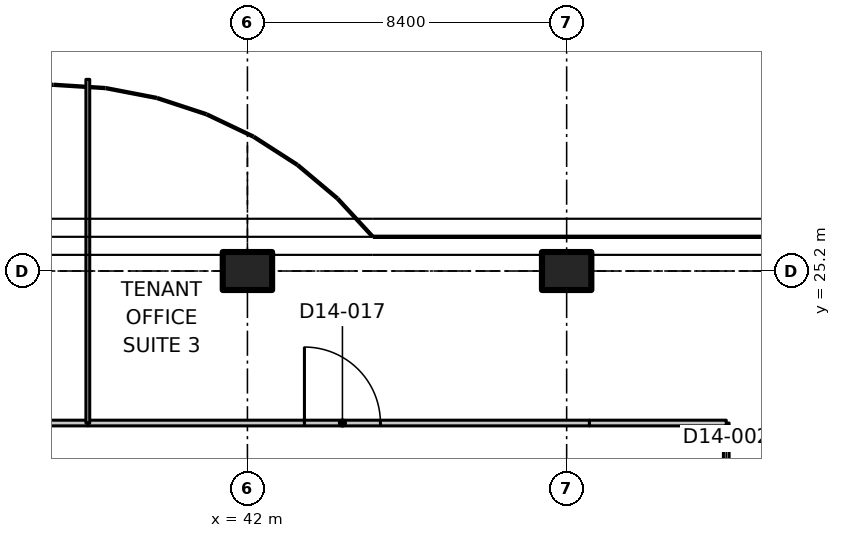
"""IFC4 building model, lengths in metres.
Left out: names, types, materials, properties, quantities, classifications, styles, units other than length and angle.
Written with IfcOpenShell. Run it as: python <this file> out.ifc"""

import sys

from ifc_helpers import new_model, si_unit, direction, frame, frame_2d, origin, origin_2d, place, context, subcontext, project, spatial, polyline, rectangle, outline, extrude, element, fill, save


model = new_model("IFC4")
c1 = context("Model", 3, precision=1e-05, world=origin(), true_north=direction((0.0, 1.0)))
c2 = subcontext(c1, "Body", "Model", "MODEL_VIEW")
j1 = project(units=[si_unit("LENGTHUNIT", "METRE"), si_unit("PLANEANGLEUNIT", "RADIAN")], contexts=[c1])
p1 = place(None, origin())
s1 = spatial("IfcSite", under=j1, at=p1, CompositionType="ELEMENT")
p2 = place(p1, origin())
s2 = spatial("IfcBuilding", under=s1, at=p2, CompositionType="ELEMENT")
p3 = place(p2, frame((0.0, 0.0, 102.5)))
s3 = spatial("IfcBuildingStorey", under=s2, at=p3, CompositionType="ELEMENT", Elevation=102.5)
for number, where, z_axis, x_axis in (
    (1, (42.0, 25.2, 0.0), (0.0, 0.0, 1.0), (0.0, 1.0, 0.0)),
    (2, (50.4, 25.2, 0.0), (0.0, 0.0, 1.0), (0.0, 1.0, 0.0)),
):
    element("IfcColumn", number, at=place(p3, frame(where, z_axis=z_axis, x_axis=x_axis)), inside=s3, PredefinedType="COLUMN", context=c2, shape_type="SweptSolid", body=[
        extrude(rectangle(XDim=1.0, YDim=1.3, at=origin_2d()), origin(), (0.0, 0.0, 1.0), 3.35),
    ])
p4 = place(p3, frame((54.6, 21.2, 0.0), z_axis=(0.0, 0.0, 1.0), x_axis=(0.0, -1.0, 0.0)))
e3 = element("IfcWall", 3, at=p4, inside=s3, PredefinedType="PARTITIONING", context=c2, shape_type="SweptSolid", body=[
    extrude(rectangle(XDim=8.2, YDim=0.15, at=frame_2d((4.1, 0.0))), origin(), (0.0, 0.0, 1.0), 3.33),
])
p5 = place(p4, frame((3.2, 0.0, 0.0)))
e4 = element("IfcOpeningElement", 4, at=p5, cuts=e3, PredefinedType="OPENING", context=c2, shape_type="SweptSolid", body=[
    extrude(rectangle(XDim=2.0, YDim=2.4, at=frame_2d((1.0, 1.2))), frame((0.0, 0.085, 0.0), z_axis=(0.0, -1.0, 0.0), x_axis=(1.0, 0.0, 0.0)), (0.0, 0.0, 1.0), 0.17),
])
p6 = place(p3, frame((29.4, 21.2, 0.0), z_axis=(0.0, 0.0, 1.0), x_axis=(1.0, 0.0, 0.0)))
e5 = element("IfcWall", 5, at=p6, inside=s3, PredefinedType="PARTITIONING", context=c2, shape_type="SweptSolid", body=[
    extrude(rectangle(XDim=8.4, YDim=0.15, at=frame_2d((4.2, 0.0))), origin(), (0.0, 0.0, 1.0), 3.33),
])
p7 = place(p6, frame((3.3, 0.0, 0.0)))
e6 = element("IfcOpeningElement", 6, at=p7, cuts=e5, PredefinedType="OPENING", context=c2, shape_type="SweptSolid", body=[
    extrude(rectangle(XDim=1.6, YDim=2.1, at=frame_2d((0.8, 1.05))), frame((0.0, 0.085, 0.0), z_axis=(0.0, -1.0, 0.0), x_axis=(1.0, 0.0, 0.0)), (0.0, 0.0, 1.0), 0.17),
])
p8 = place(p3, frame((37.8, 21.2, 0.0), z_axis=(0.0, 0.0, 1.0), x_axis=(1.0, 0.0, 0.0)))
e7 = element("IfcWall", 7, at=p8, inside=s3, PredefinedType="PARTITIONING", context=c2, shape_type="SweptSolid", body=[
    extrude(rectangle(XDim=13.2, YDim=0.15, at=frame_2d((6.6, 0.0))), origin(), (0.0, 0.0, 1.0), 3.33),
])
p9 = place(p8, frame((5.7, 0.0, 0.0)))
e8 = element("IfcOpeningElement", 8, at=p9, cuts=e7, PredefinedType="OPENING", context=c2, shape_type="SweptSolid", body=[
    extrude(rectangle(XDim=2.0, YDim=2.4, at=frame_2d((1.0, 1.2))), frame((0.0, 0.085, 0.0), z_axis=(0.0, -1.0, 0.0), x_axis=(1.0, 0.0, 0.0)), (0.0, 0.0, 1.0), 0.17),
])
p10 = place(p3, frame((51.0, 21.2, 0.0), z_axis=(0.0, 0.0, 1.0), x_axis=(1.0, 0.0, 0.0)))
e9 = element("IfcWall", 9, at=p10, inside=s3, PredefinedType="PARTITIONING", context=c2, shape_type="SweptSolid", body=[
    extrude(rectangle(XDim=3.6, YDim=0.15, at=frame_2d((1.8, 0.0))), origin(), (0.0, 0.0, 1.0), 3.33),
])
p11 = place(p3, frame((37.8, 30.243, 0.0), z_axis=(0.0, 0.0, 1.0), x_axis=(0.0, -1.0, 0.0)))
e10 = element("IfcWall", 10, at=p11, inside=s3, PredefinedType="PARTITIONING", context=c2, shape_type="SweptSolid", body=[
    extrude(outline(polyline([(0.0, 0.0), (9.043, 0.0), (9.043, 3.33), (5.493, 3.33), (5.491, 2.98), (4.595, 2.98), (4.593, 3.33), (0.0, 3.33), (0.0, 0.0)])), frame((0.0, 0.05, 0.0), z_axis=(0.0, -1.0, 0.0), x_axis=(1.0, 0.0, 0.0)), (0.0, 0.0, 1.0), 0.1),
])
p12 = place(p9, origin())
e11 = element("IfcDoor", 11, at=p12, inside=s3, OperationType="DOUBLE_DOOR_SINGLE_SWING", PredefinedType="DOOR", context=c2, shape_type="SweptSolid", body=[
    extrude(rectangle(XDim=2.0, YDim=2.4, at=frame_2d((1.0, 1.2))), frame((0.0, 0.025, 0.0), z_axis=(0.0, -1.0, 0.0), x_axis=(1.0, 0.0, 0.0)), (0.0, 0.0, 1.0), 0.05),
])
fill(e8, e11)
save(model, sys.argv[1])
